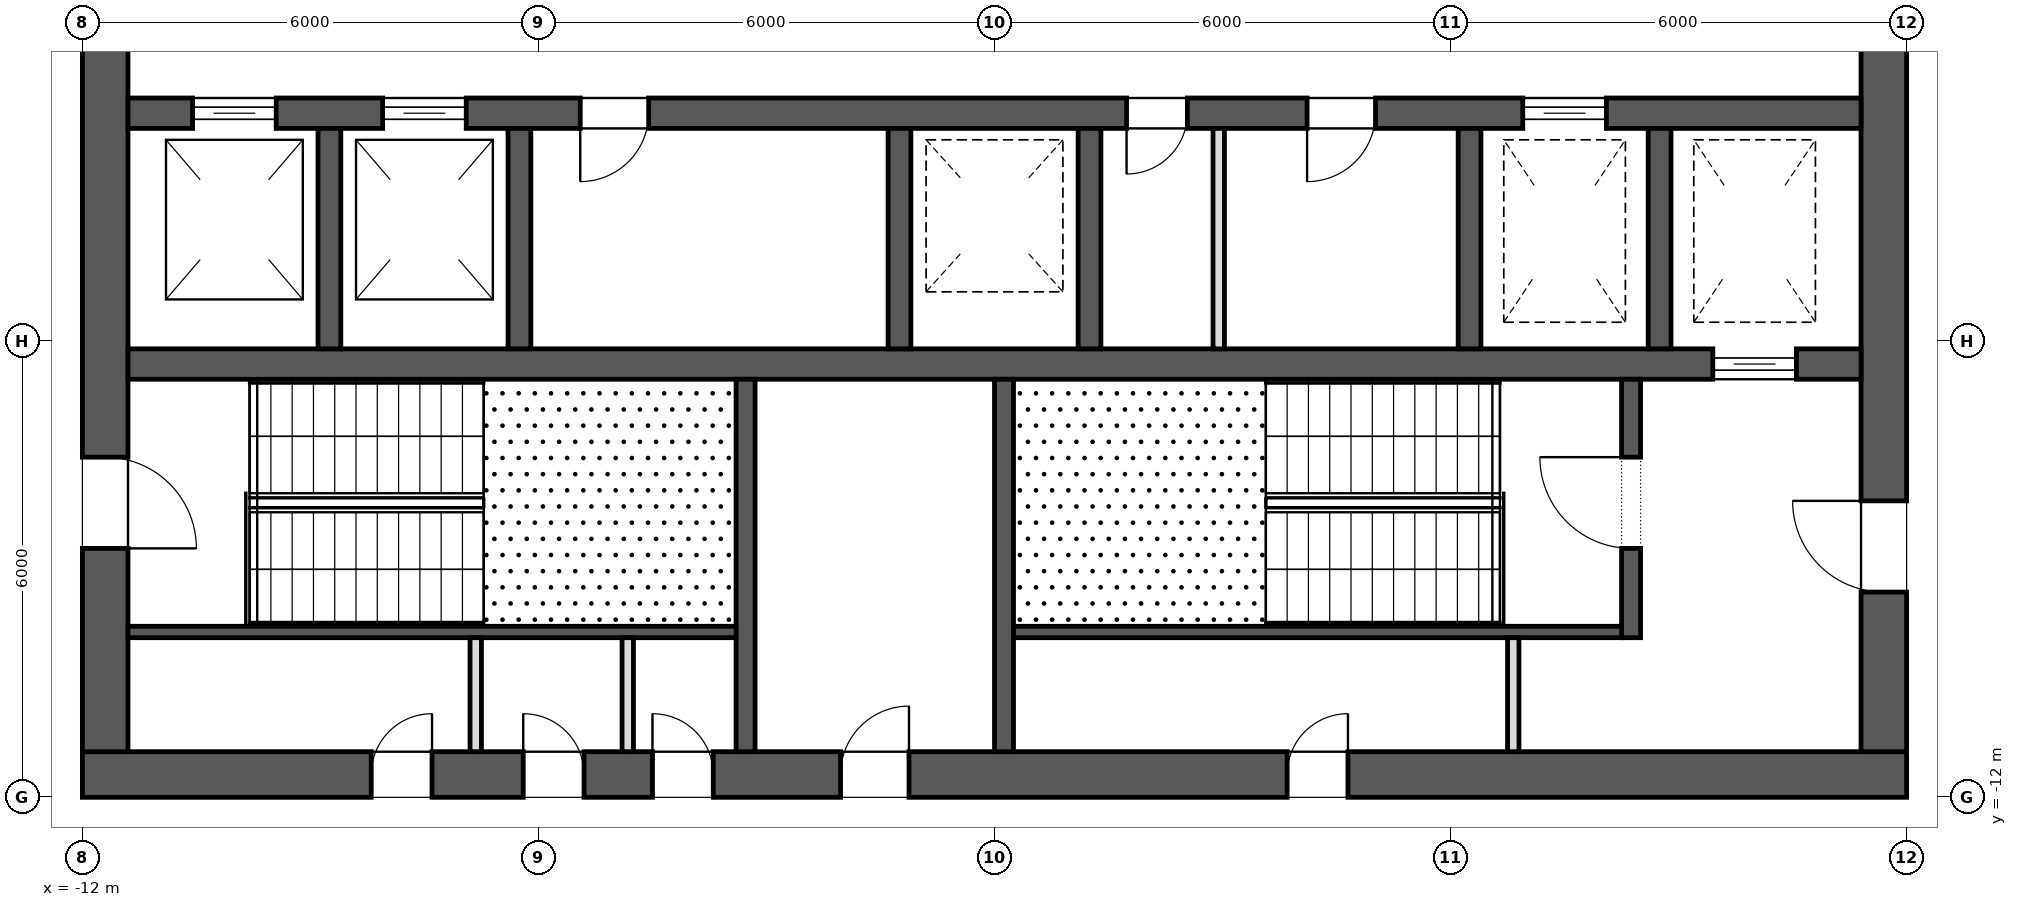
"""IFC4 building model, lengths in metres.
Left out: names, types, materials, properties, quantities, classifications, styles, units other than length and angle.
Written with IfcOpenShell. Run it as: python <this file> out.ifc"""

import sys

from ifc_helpers import new_model, si_unit, direction, frame, frame_2d, origin, place, context, subcontext, project, spatial, rectangle, extrude, element, fill, save


model = new_model("IFC4")
c1 = context("Model", 3, precision=1e-05, world=origin(), true_north=direction((0.0, 1.0)))
c2 = subcontext(c1, "Body", "Model", "MODEL_VIEW")
j1 = project(units=[si_unit("LENGTHUNIT", "METRE"), si_unit("PLANEANGLEUNIT", "RADIAN")], contexts=[c1])
p1 = place(None, origin())
s1 = spatial("IfcSite", under=j1, at=p1, CompositionType="ELEMENT")
p2 = place(p1, origin())
s2 = spatial("IfcBuilding", under=s1, at=p2, CompositionType="ELEMENT")
p3 = place(p2, frame((0.0, 0.0, 288.3)))
s3 = spatial("IfcBuildingStorey", under=s2, at=p3, CompositionType="ELEMENT", Elevation=288.3)
p4 = place(p3, frame((-12.0, -11.7, 0.0), z_axis=(0.0, 0.0, 1.0), x_axis=(1.0, 0.0, 0.0)))
e1 = element("IfcWall", 1, at=p4, inside=s3, PredefinedType="SHEAR", context=c2, shape_type="SweptSolid", body=[
    extrude(rectangle(XDim=24.0, YDim=0.6, at=frame_2d((12.0, 0.0))), origin(), (0.0, 0.0, 1.0), 4.0),
])
p5 = place(p4, frame((9.975, 0.0, 0.0)))
e2 = element("IfcOpeningElement", 2, at=p5, cuts=e1, PredefinedType="OPENING", context=c2, shape_type="SweptSolid", body=[
    extrude(rectangle(XDim=0.9, YDim=2.1, at=frame_2d((0.45, 1.05))), frame((0.0, 0.312, 0.0), z_axis=(0.0, -1.0, 0.0), x_axis=(1.0, 0.0, 0.0)), (0.0, 0.0, 1.0), 0.624),
])
p6 = place(p4, frame((3.8, 0.0, 0.0)))
e3 = element("IfcOpeningElement", 3, at=p6, cuts=e1, PredefinedType="OPENING", context=c2, shape_type="SweptSolid", body=[
    extrude(rectangle(XDim=0.8, YDim=2.1, at=frame_2d((0.4, 1.05))), frame((0.0, 0.312, 0.0), z_axis=(0.0, -1.0, 0.0), x_axis=(1.0, 0.0, 0.0)), (0.0, 0.0, 1.0), 0.624),
])
p7 = place(p4, frame((5.8, 0.0, 0.0)))
e4 = element("IfcOpeningElement", 4, at=p7, cuts=e1, PredefinedType="OPENING", context=c2, shape_type="SweptSolid", body=[
    extrude(rectangle(XDim=0.8, YDim=2.1, at=frame_2d((0.4, 1.05))), frame((0.0, 0.312, 0.0), z_axis=(0.0, -1.0, 0.0), x_axis=(1.0, 0.0, 0.0)), (0.0, 0.0, 1.0), 0.624),
])
p8 = place(p4, frame((7.5, 0.0, 0.0)))
e5 = element("IfcOpeningElement", 5, at=p8, cuts=e1, PredefinedType="OPENING", context=c2, shape_type="SweptSolid", body=[
    extrude(rectangle(XDim=0.8, YDim=2.1, at=frame_2d((0.4, 1.05))), frame((0.0, 0.312, 0.0), z_axis=(0.0, -1.0, 0.0), x_axis=(1.0, 0.0, 0.0)), (0.0, 0.0, 1.0), 0.624),
])
p9 = place(p4, frame((15.85, 0.0, 0.0)))
e6 = element("IfcOpeningElement", 6, at=p9, cuts=e1, PredefinedType="OPENING", context=c2, shape_type="SweptSolid", body=[
    extrude(rectangle(XDim=0.8, YDim=2.1, at=frame_2d((0.4, 1.05))), frame((0.0, 0.312, 0.0), z_axis=(0.0, -1.0, 0.0), x_axis=(1.0, 0.0, 0.0)), (0.0, 0.0, 1.0), 0.624),
])
p10 = place(p3, frame((11.7, -11.4, 0.0), z_axis=(0.0, 0.0, 1.0), x_axis=(0.0, 1.0, 0.0)))
e7 = element("IfcWall", 7, at=p10, inside=s3, PredefinedType="SHEAR", context=c2, shape_type="SweptSolid", body=[
    extrude(rectangle(XDim=22.8, YDim=0.6, at=frame_2d((11.4, 0.0))), origin(), (0.0, 0.0, 1.0), 4.0),
])
p11 = place(p10, frame((10.2, 0.0, 0.0)))
e8 = element("IfcOpeningElement", 8, at=p11, cuts=e7, PredefinedType="OPENING", context=c2, shape_type="SweptSolid", body=[
    extrude(rectangle(XDim=2.4, YDim=2.1, at=frame_2d((1.2, 1.05))), frame((0.0, 0.312, 0.0), z_axis=(0.0, -1.0, 0.0), x_axis=(1.0, 0.0, 0.0)), (0.0, 0.0, 1.0), 0.624),
])
p12 = place(p10, frame((19.5, 0.0, 0.0)))
e9 = element("IfcOpeningElement", 9, at=p12, cuts=e7, PredefinedType="OPENING", context=c2, shape_type="SweptSolid", body=[
    extrude(rectangle(XDim=1.2, YDim=2.1, at=frame_2d((0.6, 1.05))), frame((0.0, 0.312, 0.0), z_axis=(0.0, -1.0, 0.0), x_axis=(1.0, 0.0, 0.0)), (0.0, 0.0, 1.0), 0.624),
])
p13 = place(p10, frame((2.1, 0.0, 0.0)))
e10 = element("IfcOpeningElement", 10, at=p13, cuts=e7, PredefinedType="OPENING", context=c2, shape_type="SweptSolid", body=[
    extrude(rectangle(XDim=1.2, YDim=2.1, at=frame_2d((0.6, 1.05))), frame((0.0, 0.312, 0.0), z_axis=(0.0, -1.0, 0.0), x_axis=(1.0, 0.0, 0.0)), (0.0, 0.0, 1.0), 0.624),
])
p14 = place(p3, frame((-11.7, -11.4, 0.0), z_axis=(0.0, 0.0, 1.0), x_axis=(0.0, 1.0, 0.0)))
e11 = element("IfcWall", 11, at=p14, inside=s3, PredefinedType="SHEAR", context=c2, shape_type="SweptSolid", body=[
    extrude(rectangle(XDim=22.8, YDim=0.6, at=frame_2d((11.4, 0.0))), origin(), (0.0, 0.0, 1.0), 4.0),
])
p15 = place(p14, frame((10.2, 0.0, 0.0)))
e12 = element("IfcOpeningElement", 12, at=p15, cuts=e11, PredefinedType="OPENING", context=c2, shape_type="SweptSolid", body=[
    extrude(rectangle(XDim=2.4, YDim=2.1, at=frame_2d((1.2, 1.05))), frame((0.0, 0.312, 0.0), z_axis=(0.0, -1.0, 0.0), x_axis=(1.0, 0.0, 0.0)), (0.0, 0.0, 1.0), 0.624),
])
p16 = place(p14, frame((18.925, 0.0, 0.0)))
e13 = element("IfcOpeningElement", 13, at=p16, cuts=e11, PredefinedType="OPENING", context=c2, shape_type="SweptSolid", body=[
    extrude(rectangle(XDim=1.2, YDim=2.1, at=frame_2d((0.6, 1.05))), frame((0.0, 0.312, 0.0), z_axis=(0.0, -1.0, 0.0), x_axis=(1.0, 0.0, 0.0)), (0.0, 0.0, 1.0), 0.624),
])
p17 = place(p14, frame((2.675, 0.0, 0.0)))
e14 = element("IfcOpeningElement", 14, at=p17, cuts=e11, PredefinedType="OPENING", context=c2, shape_type="SweptSolid", body=[
    extrude(rectangle(XDim=1.2, YDim=2.1, at=frame_2d((0.6, 1.05))), frame((0.0, 0.312, 0.0), z_axis=(0.0, -1.0, 0.0), x_axis=(1.0, 0.0, 0.0)), (0.0, 0.0, 1.0), 0.624),
])
p18 = place(p3, frame((-11.4, -3.0, 0.0), z_axis=(0.0, 0.0, 1.0), x_axis=(1.0, 0.0, 0.0)))
e15 = element("IfcWall", 15, at=p18, inside=s3, PredefinedType="SHEAR", context=c2, shape_type="SweptSolid", body=[
    extrude(rectangle(XDim=22.8, YDim=0.4, at=frame_2d((11.4, 0.0))), origin(), (0.0, 0.0, 1.0), 4.0),
])
p19 = place(p18, frame((0.85, 0.0, 0.0)))
e16 = element("IfcOpeningElement", 16, at=p19, cuts=e15, PredefinedType="OPENING", context=c2, shape_type="SweptSolid", body=[
    extrude(rectangle(XDim=1.1, YDim=2.1, at=frame_2d((0.55, 1.05))), frame((0.0, 0.212, 0.0), z_axis=(0.0, -1.0, 0.0), x_axis=(1.0, 0.0, 0.0)), (0.0, 0.0, 1.0), 0.424),
])
p20 = place(p18, frame((3.35, 0.0, 0.0)))
e17 = element("IfcOpeningElement", 17, at=p20, cuts=e15, PredefinedType="OPENING", context=c2, shape_type="SweptSolid", body=[
    extrude(rectangle(XDim=1.1, YDim=2.1, at=frame_2d((0.55, 1.05))), frame((0.0, 0.212, 0.0), z_axis=(0.0, -1.0, 0.0), x_axis=(1.0, 0.0, 0.0)), (0.0, 0.0, 1.0), 0.424),
])
p21 = place(p18, frame((18.35, 0.0, 0.0)))
e18 = element("IfcOpeningElement", 18, at=p21, cuts=e15, PredefinedType="OPENING", context=c2, shape_type="SweptSolid", body=[
    extrude(rectangle(XDim=1.1, YDim=2.1, at=frame_2d((0.55, 1.05))), frame((0.0, 0.212, 0.0), z_axis=(0.0, -1.0, 0.0), x_axis=(1.0, 0.0, 0.0)), (0.0, 0.0, 1.0), 0.424),
])
p22 = place(p18, frame((13.137, 0.0, 0.0)))
e19 = element("IfcOpeningElement", 19, at=p22, cuts=e15, PredefinedType="OPENING", context=c2, shape_type="SweptSolid", body=[
    extrude(rectangle(XDim=0.8, YDim=2.1, at=frame_2d((0.4, 1.05))), frame((0.0, 0.212, 0.0), z_axis=(0.0, -1.0, 0.0), x_axis=(1.0, 0.0, 0.0)), (0.0, 0.0, 1.0), 0.424),
])
p23 = place(p18, frame((15.512, 0.0, 0.0)))
e20 = element("IfcOpeningElement", 20, at=p23, cuts=e15, PredefinedType="OPENING", context=c2, shape_type="SweptSolid", body=[
    extrude(rectangle(XDim=0.9, YDim=2.1, at=frame_2d((0.45, 1.05))), frame((0.0, 0.212, 0.0), z_axis=(0.0, -1.0, 0.0), x_axis=(1.0, 0.0, 0.0)), (0.0, 0.0, 1.0), 0.424),
])
p24 = place(p18, frame((5.95, 0.0, 0.0)))
e21 = element("IfcOpeningElement", 21, at=p24, cuts=e15, PredefinedType="OPENING", context=c2, shape_type="SweptSolid", body=[
    extrude(rectangle(XDim=0.9, YDim=2.1, at=frame_2d((0.45, 1.05))), frame((0.0, 0.212, 0.0), z_axis=(0.0, -1.0, 0.0), x_axis=(1.0, 0.0, 0.0)), (0.0, 0.0, 1.0), 0.424),
])
p25 = place(p3, frame((-11.4, -6.3, 0.0), z_axis=(0.0, 0.0, 1.0), x_axis=(1.0, 0.0, 0.0)))
e22 = element("IfcWall", 22, at=p25, inside=s3, PredefinedType="SHEAR", context=c2, shape_type="SweptSolid", body=[
    extrude(rectangle(XDim=22.8, YDim=0.4, at=frame_2d((11.4, 0.0))), origin(), (0.0, 0.0, 1.0), 4.0),
])
p26 = place(p25, frame((20.85, 0.0, 0.0)))
e23 = element("IfcOpeningElement", 23, at=p26, cuts=e22, PredefinedType="OPENING", context=c2, shape_type="SweptSolid", body=[
    extrude(rectangle(XDim=1.1, YDim=2.1, at=frame_2d((0.55, 1.05))), frame((0.0, 0.212, 0.0), z_axis=(0.0, -1.0, 0.0), x_axis=(1.0, 0.0, 0.0)), (0.0, 0.0, 1.0), 0.424),
])
for number, where, z_axis, x_axis in (
    (24, (-8.75, -6.1, 0.0), (0.0, 0.0, 1.0), (0.0, 1.0, 0.0)),
    (25, (-6.25, -6.1, 0.0), (0.0, 0.0, 1.0), (0.0, 1.0, 0.0)),
    (26, (-1.25, -6.1, 0.0), (0.0, 0.0, 1.0), (0.0, 1.0, 0.0)),
    (27, (1.25, -6.1, 0.0), (0.0, 0.0, 1.0), (0.0, 1.0, 0.0)),
    (28, (6.25, -6.1, 0.0), (0.0, 0.0, 1.0), (0.0, 1.0, 0.0)),
    (29, (8.75, -6.1, 0.0), (0.0, 0.0, 1.0), (0.0, 1.0, 0.0)),
):
    element("IfcWall", number, at=place(p3, frame(where, z_axis=z_axis, x_axis=x_axis)), inside=s3, PredefinedType="SHEAR", context=c2, shape_type="SweptSolid", body=[
        extrude(rectangle(XDim=2.9, YDim=0.3, at=frame_2d((1.45, 0.0))), origin(), (0.0, 0.0, 1.0), 4.0),
    ])
for number, where, z_axis, x_axis in (
    (30, (-3.275, -11.4, 0.0), (0.0, 0.0, 1.0), (0.0, 1.0, 0.0)),
    (31, (0.125, -11.4, 0.0), (0.0, 0.0, 1.0), (0.0, 1.0, 0.0)),
):
    element("IfcWall", number, at=place(p3, frame(where, z_axis=z_axis, x_axis=x_axis)), inside=s3, PredefinedType="SHEAR", context=c2, shape_type="SweptSolid", body=[
        extrude(rectangle(XDim=4.9, YDim=0.25, at=frame_2d((2.45, 0.0))), origin(), (0.0, 0.0, 1.0), 3.7),
    ])
p27 = place(p3, frame((8.375, -9.9, 0.0), z_axis=(0.0, 0.0, 1.0), x_axis=(0.0, 1.0, 0.0)))
e32 = element("IfcWall", 32, at=p27, inside=s3, PredefinedType="SHEAR", context=c2, shape_type="SweptSolid", body=[
    extrude(rectangle(XDim=3.4, YDim=0.25, at=frame_2d((1.7, 0.0))), origin(), (0.0, 0.0, 1.0), 3.7),
])
p28 = place(p27, frame((1.175, 0.0, 0.0)))
e33 = element("IfcOpeningElement", 33, at=p28, cuts=e32, PredefinedType="OPENING", context=c2, shape_type="SweptSolid", body=[
    extrude(rectangle(XDim=1.2, YDim=2.1, at=frame_2d((0.6, 1.05))), frame((0.0, 0.137, 0.0), z_axis=(0.0, -1.0, 0.0), x_axis=(1.0, 0.0, 0.0)), (0.0, 0.0, 1.0), 0.274),
])
for number, where, z_axis, x_axis in (
    (34, (-11.4, -9.825, 0.0), (0.0, 0.0, 1.0), (1.0, 0.0, 0.0)),
    (35, (0.25, -9.825, 0.0), (0.0, 0.0, 1.0), (1.0, 0.0, 0.0)),
):
    element("IfcWall", number, at=place(p3, frame(where, z_axis=z_axis, x_axis=x_axis)), inside=s3, PredefinedType="SHEAR", context=c2, shape_type="SweptSolid", body=[
        extrude(rectangle(XDim=8.0, YDim=0.15, at=frame_2d((4.0, 0.0))), origin(), (0.0, 0.0, 1.0), 3.7),
    ])
for number, where, z_axis, x_axis in (
    (36, (-6.825, -11.4, 0.0), (0.0, 0.0, 1.0), (0.0, 1.0, 0.0)),
    (37, (-4.825, -11.4, 0.0), (0.0, 0.0, 1.0), (0.0, 1.0, 0.0)),
    (38, (6.825, -11.4, 0.0), (0.0, 0.0, 1.0), (0.0, 1.0, 0.0)),
):
    element("IfcWall", number, at=place(p3, frame(where, z_axis=z_axis, x_axis=x_axis)), inside=s3, PredefinedType="PARTITIONING", context=c2, shape_type="SweptSolid", body=[
        extrude(rectangle(XDim=1.5, YDim=0.15, at=frame_2d((0.75, 0.0))), origin(), (0.0, 0.0, 1.0), 3.7),
    ])
p29 = place(p3, frame((2.95, -6.1, 0.0), z_axis=(0.0, 0.0, 1.0), x_axis=(0.0, 1.0, 0.0)))
e39 = element("IfcWall", 39, at=p29, inside=s3, PredefinedType="PARTITIONING", context=c2, shape_type="SweptSolid", body=[
    extrude(rectangle(XDim=2.9, YDim=0.15, at=frame_2d((1.45, 0.0))), origin(), (0.0, 0.0, 1.0), 3.7),
])
p30 = place(p26, origin())
e40 = element("IfcDoor", 40, at=p30, inside=s3, OperationType="SLIDING_TO_LEFT", PredefinedType="DOOR", context=c2, shape_type="SweptSolid", body=[
    extrude(rectangle(XDim=1.1, YDim=2.1, at=frame_2d((0.55, 1.05))), frame((0.0, 0.025, 0.0), z_axis=(0.0, -1.0, 0.0), x_axis=(1.0, 0.0, 0.0)), (0.0, 0.0, 1.0), 0.05),
])
fill(e23, e40)
p31 = place(p19, origin())
e41 = element("IfcDoor", 41, at=p31, inside=s3, OperationType="SLIDING_TO_LEFT", PredefinedType="DOOR", context=c2, shape_type="SweptSolid", body=[
    extrude(rectangle(XDim=1.1, YDim=2.1, at=frame_2d((0.55, 1.05))), frame((0.0, 0.025, 0.0), z_axis=(0.0, -1.0, 0.0), x_axis=(1.0, 0.0, 0.0)), (0.0, 0.0, 1.0), 0.05),
])
fill(e16, e41)
p32 = place(p20, origin())
e42 = element("IfcDoor", 42, at=p32, inside=s3, OperationType="SLIDING_TO_LEFT", PredefinedType="DOOR", context=c2, shape_type="SweptSolid", body=[
    extrude(rectangle(XDim=1.1, YDim=2.1, at=frame_2d((0.55, 1.05))), frame((0.0, 0.025, 0.0), z_axis=(0.0, -1.0, 0.0), x_axis=(1.0, 0.0, 0.0)), (0.0, 0.0, 1.0), 0.05),
])
fill(e17, e42)
p33 = place(p21, origin())
e43 = element("IfcDoor", 43, at=p33, inside=s3, OperationType="SLIDING_TO_LEFT", PredefinedType="DOOR", context=c2, shape_type="SweptSolid", body=[
    extrude(rectangle(XDim=1.1, YDim=2.1, at=frame_2d((0.55, 1.05))), frame((0.0, 0.025, 0.0), z_axis=(0.0, -1.0, 0.0), x_axis=(1.0, 0.0, 0.0)), (0.0, 0.0, 1.0), 0.05),
])
fill(e18, e43)
p34 = place(p17, frame((1.2, 0.0, 0.0), z_axis=(0.0, 0.0, 1.0), x_axis=(-1.0, 0.0, 0.0)))
e44 = element("IfcDoor", 44, at=p34, inside=s3, OperationType="SINGLE_SWING_LEFT", PredefinedType="DOOR", context=c2, shape_type="SweptSolid", body=[
    extrude(rectangle(XDim=1.2, YDim=2.1, at=frame_2d((0.6, 1.05))), frame((0.0, 0.025, 0.0), z_axis=(0.0, -1.0, 0.0), x_axis=(1.0, 0.0, 0.0)), (0.0, 0.0, 1.0), 0.05),
])
fill(e14, e44)
p35 = place(p28, origin())
e45 = element("IfcDoor", 45, at=p35, inside=s3, OperationType="SINGLE_SWING_LEFT", PredefinedType="DOOR", context=c2, shape_type="SweptSolid", body=[
    extrude(rectangle(XDim=1.2, YDim=2.1, at=frame_2d((0.6, 1.05))), frame((0.0, 0.025, 0.0), z_axis=(0.0, -1.0, 0.0), x_axis=(1.0, 0.0, 0.0)), (0.0, 0.0, 1.0), 0.05),
])
fill(e33, e45)
p36 = place(p13, origin())
e46 = element("IfcDoor", 46, at=p36, inside=s3, OperationType="SINGLE_SWING_LEFT", PredefinedType="DOOR", context=c2, shape_type="SweptSolid", body=[
    extrude(rectangle(XDim=1.2, YDim=2.1, at=frame_2d((0.6, 1.05))), frame((0.0, 0.025, 0.0), z_axis=(0.0, -1.0, 0.0), x_axis=(1.0, 0.0, 0.0)), (0.0, 0.0, 1.0), 0.05),
])
fill(e10, e46)
p37 = place(p5, origin())
e47 = element("IfcDoor", 47, at=p37, inside=s3, OperationType="SINGLE_SWING_LEFT", PredefinedType="DOOR", context=c2, shape_type="SweptSolid", body=[
    extrude(rectangle(XDim=0.9, YDim=2.1, at=frame_2d((0.45, 1.05))), frame((0.0, 0.025, 0.0), z_axis=(0.0, -1.0, 0.0), x_axis=(1.0, 0.0, 0.0)), (0.0, 0.0, 1.0), 0.05),
])
fill(e2, e47)
p38 = place(p6, origin())
e48 = element("IfcDoor", 48, at=p38, inside=s3, OperationType="SINGLE_SWING_LEFT", PredefinedType="DOOR", context=c2, shape_type="SweptSolid", body=[
    extrude(rectangle(XDim=0.8, YDim=2.1, at=frame_2d((0.4, 1.05))), frame((0.0, 0.025, 0.0), z_axis=(0.0, -1.0, 0.0), x_axis=(1.0, 0.0, 0.0)), (0.0, 0.0, 1.0), 0.05),
])
fill(e3, e48)
p39 = place(p7, origin())
e49 = element("IfcDoor", 49, at=p39, inside=s3, OperationType="SINGLE_SWING_RIGHT", PredefinedType="DOOR", context=c2, shape_type="SweptSolid", body=[
    extrude(rectangle(XDim=0.8, YDim=2.1, at=frame_2d((0.4, 1.05))), frame((0.0, 0.025, 0.0), z_axis=(0.0, -1.0, 0.0), x_axis=(1.0, 0.0, 0.0)), (0.0, 0.0, 1.0), 0.05),
])
fill(e4, e49)
p40 = place(p8, origin())
e50 = element("IfcDoor", 50, at=p40, inside=s3, OperationType="SINGLE_SWING_RIGHT", PredefinedType="DOOR", context=c2, shape_type="SweptSolid", body=[
    extrude(rectangle(XDim=0.8, YDim=2.1, at=frame_2d((0.4, 1.05))), frame((0.0, 0.025, 0.0), z_axis=(0.0, -1.0, 0.0), x_axis=(1.0, 0.0, 0.0)), (0.0, 0.0, 1.0), 0.05),
])
fill(e5, e50)
p41 = place(p9, origin())
e51 = element("IfcDoor", 51, at=p41, inside=s3, OperationType="SINGLE_SWING_LEFT", PredefinedType="DOOR", context=c2, shape_type="SweptSolid", body=[
    extrude(rectangle(XDim=0.8, YDim=2.1, at=frame_2d((0.4, 1.05))), frame((0.0, 0.025, 0.0), z_axis=(0.0, -1.0, 0.0), x_axis=(1.0, 0.0, 0.0)), (0.0, 0.0, 1.0), 0.05),
])
fill(e6, e51)
p42 = place(p22, frame((0.8, 0.0, 0.0), z_axis=(0.0, 0.0, 1.0), x_axis=(-1.0, 0.0, 0.0)))
e52 = element("IfcDoor", 52, at=p42, inside=s3, OperationType="SINGLE_SWING_LEFT", PredefinedType="DOOR", context=c2, shape_type="SweptSolid", body=[
    extrude(rectangle(XDim=0.8, YDim=2.1, at=frame_2d((0.4, 1.05))), frame((0.0, 0.025, 0.0), z_axis=(0.0, -1.0, 0.0), x_axis=(1.0, 0.0, 0.0)), (0.0, 0.0, 1.0), 0.05),
])
fill(e19, e52)
p43 = place(p23, frame((0.9, 0.0, 0.0), z_axis=(0.0, 0.0, 1.0), x_axis=(-1.0, 0.0, 0.0)))
e53 = element("IfcDoor", 53, at=p43, inside=s3, OperationType="SINGLE_SWING_LEFT", PredefinedType="DOOR", context=c2, shape_type="SweptSolid", body=[
    extrude(rectangle(XDim=0.9, YDim=2.1, at=frame_2d((0.45, 1.05))), frame((0.0, 0.025, 0.0), z_axis=(0.0, -1.0, 0.0), x_axis=(1.0, 0.0, 0.0)), (0.0, 0.0, 1.0), 0.05),
])
fill(e20, e53)
p44 = place(p24, frame((0.9, 0.0, 0.0), z_axis=(0.0, 0.0, 1.0), x_axis=(-1.0, 0.0, 0.0)))
e54 = element("IfcDoor", 54, at=p44, inside=s3, OperationType="SINGLE_SWING_LEFT", PredefinedType="DOOR", context=c2, shape_type="SweptSolid", body=[
    extrude(rectangle(XDim=0.9, YDim=2.1, at=frame_2d((0.45, 1.05))), frame((0.0, 0.025, 0.0), z_axis=(0.0, -1.0, 0.0), x_axis=(1.0, 0.0, 0.0)), (0.0, 0.0, 1.0), 0.05),
])
fill(e21, e54)
save(model, sys.argv[1])
